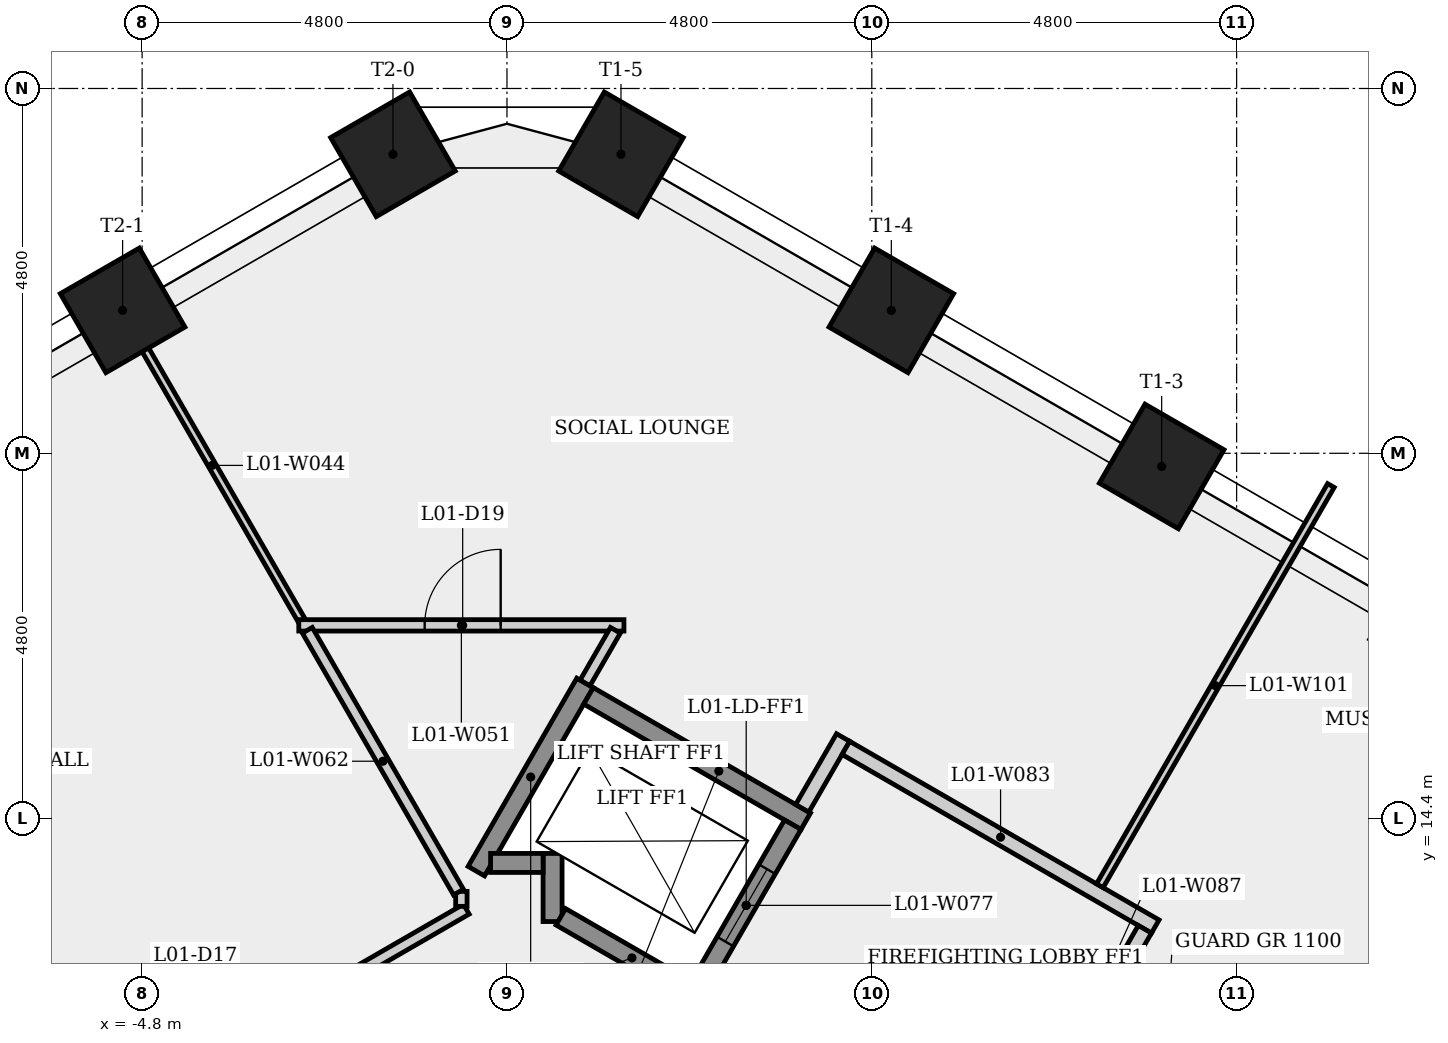
"""IFC4 building model, lengths in metres.
Left out: names, types, materials, properties, quantities, classifications, styles, units other than length and angle.
Written with IfcOpenShell. Run it as: python <this file> out.ifc"""

import sys

from ifc_helpers import new_model, si_unit, direction, frame, frame_2d, origin, origin_2d, place, context, subcontext, project, spatial, rectangle, extrude, element, fill, save


model = new_model("IFC4")
c1 = context("Model", 3, precision=1e-05, world=origin(), true_north=direction((0.0, 1.0)))
c2 = subcontext(c1, "Body", "Model", "MODEL_VIEW")
j1 = project(units=[si_unit("LENGTHUNIT", "METRE"), si_unit("PLANEANGLEUNIT", "RADIAN")], contexts=[c1])
p1 = place(None, origin())
s1 = spatial("IfcSite", under=j1, at=p1, CompositionType="ELEMENT")
p2 = place(p1, origin())
s2 = spatial("IfcBuilding", under=s1, at=p2, CompositionType="ELEMENT")
p3 = place(p2, frame((0.0, 0.0, 7.0)))
s3 = spatial("IfcBuildingStorey", under=s2, at=p3, CompositionType="ELEMENT", Elevation=7.0)
for number, where, z_axis, x_axis in (
    (1, (8.614, 19.027, 0.0), (0.0, 0.0, 1.0), (0.5, 0.866, 0.0)),
    (2, (5.057, 21.08, 0.0), (0.0, 0.0, 1.0), (0.5, 0.866, 0.0)),
    (3, (1.5, 23.134, 0.0), (0.0, 0.0, 1.0), (0.5, 0.866, 0.0)),
    (4, (-1.5, 23.134, 0.0), (0.0, 0.0, 1.0), (-0.5, 0.866, 0.0)),
    (5, (-5.057, 21.08, 0.0), (0.0, 0.0, 1.0), (-0.5, 0.866, 0.0)),
):
    element("IfcColumn", number, at=place(p3, frame(where, z_axis=z_axis, x_axis=x_axis)), inside=s3, PredefinedType="COLUMN", context=c2, shape_type="SweptSolid", body=[
        extrude(rectangle(XDim=1.2, YDim=1.2, at=origin_2d()), origin(), (0.0, 0.0, 1.0), 4.5),
    ])
p4 = place(p3, frame((-10.598, 7.391, 0.0), z_axis=(0.0, 0.0, 1.0), x_axis=(0.866022183431, 0.500005577774, 0.0)))
e6 = element("IfcWall", 6, at=p4, inside=s3, PredefinedType="PARTITIONING", context=c2, shape_type="SweptSolid", body=[
    extrude(rectangle(XDim=11.619, YDim=0.15, at=frame_2d((5.81, 0.0))), origin(), (0.0, 0.0, 1.0), 4.1),
])
p5 = place(p4, frame((7.001, 0.0, 0.0)))
e7 = element("IfcOpeningElement", 7, at=p5, cuts=e6, PredefinedType="OPENING", context=c2, shape_type="SweptSolid", body=[
    extrude(rectangle(XDim=1.0, YDim=2.1, at=frame_2d((0.5, 1.05))), frame((0.0, 0.085, 0.0), z_axis=(0.0, -1.0, 0.0), x_axis=(1.0, 0.0, 0.0)), (0.0, 0.0, 1.0), 0.17),
])
p6 = place(p3, frame((-5.057, 21.08, 0.0), z_axis=(0.0, 0.0, 1.0), x_axis=(0.500018540756, -0.866014699009, 0.0)))
e8 = element("IfcWall", 8, at=p6, inside=s3, PredefinedType="PARTITIONING", context=c2, shape_type="SweptSolid", body=[
    extrude(rectangle(XDim=4.711, YDim=0.1, at=frame_2d((2.355, 0.0))), origin(), (0.0, 0.0, 1.0), 4.1),
])
p7 = place(p3, frame((-2.739, 16.936, 0.0), z_axis=(0.0, 0.0, 1.0), x_axis=(1.0, 0.0, 0.0)))
e9 = element("IfcWall", 9, at=p7, inside=s3, PredefinedType="PARTITIONING", context=c2, shape_type="SweptSolid", body=[
    extrude(rectangle(XDim=4.278, YDim=0.15, at=frame_2d((2.139, 0.0))), origin(), (0.0, 0.0, 1.0), 4.1),
])
p8 = place(p7, frame((1.656, 0.0, 0.0)))
e10 = element("IfcOpeningElement", 10, at=p8, cuts=e9, PredefinedType="OPENING", context=c2, shape_type="SweptSolid", body=[
    extrude(rectangle(XDim=1.0, YDim=2.1, at=frame_2d((0.5, 1.05))), frame((0.0, 0.085, 0.0), z_axis=(0.0, -1.0, 0.0), x_axis=(1.0, 0.0, 0.0)), (0.0, 0.0, 1.0), 0.17),
])
p9 = place(p3, frame((-0.6, 13.239, 0.0), z_axis=(0.0, 0.0, 1.0), x_axis=(0.0, 1.0, 0.0)))
e11 = element("IfcWall", 11, at=p9, inside=s3, PredefinedType="PARTITIONING", context=c2, shape_type="SweptSolid", body=[
    extrude(rectangle(XDim=0.197, YDim=0.15, at=frame_2d((0.099, 0.0))), origin(), (0.0, 0.0, 1.0), 4.1),
])
p10 = place(p3, frame((-0.637, 13.426, 0.0), z_axis=(0.0, 0.0, 1.0), x_axis=(-0.500046503579, 0.865998553266, 0.0)))
e12 = element("IfcWall", 12, at=p10, inside=s3, PredefinedType="PARTITIONING", context=c2, shape_type="SweptSolid", body=[
    extrude(rectangle(XDim=3.978, YDim=0.15, at=frame_2d((1.989, 0.0))), origin(), (0.0, 0.0, 1.0), 4.1),
])
p11 = place(p3, frame((-0.403, 13.702, 0.0), z_axis=(0.0, 0.0, 1.0), x_axis=(0.499976111731, 0.866039195244, 0.0)))
e13 = element("IfcWall", 13, at=p11, inside=s3, PredefinedType="SHEAR", context=c2, shape_type="SweptSolid", body=[
    extrude(rectangle(XDim=2.861, YDim=0.25, at=frame_2d((1.43, 0.0))), origin(), (0.0, 0.0, 1.0), 4.1),
])
p12 = place(p3, frame((0.6, 13.039, 0.0), z_axis=(0.0, 0.0, 1.0), x_axis=(0.0, 1.0, 0.0)))
e14 = element("IfcWall", 14, at=p12, inside=s3, PredefinedType="SHEAR", context=c2, shape_type="SweptSolid", body=[
    extrude(rectangle(XDim=0.896, YDim=0.25, at=frame_2d((0.448, 0.0))), origin(), (0.0, 0.0, 1.0), 4.1),
])
p13 = place(p3, frame((0.475, 13.81, 0.0), z_axis=(0.0, 0.0, 1.0), x_axis=(-1.0, 0.0, 0.0)))
e15 = element("IfcWall", 15, at=p13, inside=s3, PredefinedType="SHEAR", context=c2, shape_type="SweptSolid", body=[
    extrude(rectangle(XDim=0.691, YDim=0.25, at=frame_2d((0.345, 0.0))), origin(), (0.0, 0.0, 1.0), 4.5),
])
p14 = place(p3, frame((1.073, 16.008, 0.0), z_axis=(0.0, 0.0, 1.0), x_axis=(0.866040211805, -0.499974350878, 0.0)))
e16 = element("IfcWall", 16, at=p14, inside=s3, PredefinedType="SHEAR", context=c2, shape_type="SweptSolid", body=[
    extrude(rectangle(XDim=3.3, YDim=0.25, at=frame_2d((1.65, 0.0))), origin(), (0.0, 0.0, 1.0), 4.1),
])
p15 = place(p3, frame((1.427, 16.871, 0.0), z_axis=(0.0, 0.0, 1.0), x_axis=(-0.499951716245, -0.866053278629, 0.0)))
e17 = element("IfcWall", 17, at=p15, inside=s3, PredefinedType="PARTITIONING", context=c2, shape_type="SweptSolid", body=[
    extrude(rectangle(XDim=0.799, YDim=0.15, at=frame_2d((0.399, 0.0))), origin(), (0.0, 0.0, 1.0), 4.1),
])
p16 = place(p3, frame((2.581, 12.02, 0.0), z_axis=(0.0, 0.0, 1.0), x_axis=(-0.86603892542, 0.499976579108, 0.0)))
e18 = element("IfcWall", 18, at=p16, inside=s3, PredefinedType="SHEAR", context=c2, shape_type="SweptSolid", body=[
    extrude(rectangle(XDim=2.162, YDim=0.25, at=frame_2d((1.081, 0.0))), origin(), (0.0, 0.0, 1.0), 4.1),
])
p17 = place(p3, frame((2.535, 12.191, 0.0), z_axis=(0.0, 0.0, 1.0), x_axis=(0.500061746146, 0.865989751695, 0.0)))
e19 = element("IfcWall", 19, at=p17, inside=s3, PredefinedType="SHEAR", context=c2, shape_type="SweptSolid", body=[
    extrude(rectangle(XDim=2.45, YDim=0.25, at=frame_2d((1.225, 0.0))), origin(), (0.0, 0.0, 1.0), 4.5),
])
p18 = place(p17, frame((0.675, 0.0, 0.0)))
e20 = element("IfcOpeningElement", 20, at=p18, cuts=e19, PredefinedType="OPENING", context=c2, shape_type="SweptSolid", body=[
    extrude(rectangle(XDim=1.1, YDim=2.1, at=frame_2d((0.55, 1.05))), frame((0.0, 0.135, 0.0), z_axis=(0.0, -1.0, 0.0), x_axis=(1.0, 0.0, 0.0)), (0.0, 0.0, 1.0), 0.27),
])
p19 = place(p3, frame((3.885, 14.529, 0.0), z_axis=(0.0, 0.0, 1.0), x_axis=(0.499997628298, 0.866026773083, 0.0)))
e21 = element("IfcWall", 21, at=p19, inside=s3, PredefinedType="PARTITIONING", context=c2, shape_type="SweptSolid", body=[
    extrude(rectangle(XDim=1.075, YDim=0.2, at=frame_2d((0.538, 0.0))), origin(), (0.0, 0.0, 1.0), 4.1),
])
p20 = place(p3, frame((4.459, 15.323, 0.0), z_axis=(0.0, 0.0, 1.0), x_axis=(0.866016039709, -0.500016218704, 0.0)))
e22 = element("IfcWall", 22, at=p20, inside=s3, PredefinedType="PARTITIONING", context=c2, shape_type="SweptSolid", body=[
    extrude(rectangle(XDim=4.7, YDim=0.2, at=frame_2d((2.35, 0.0))), origin(), (0.0, 0.0, 1.0), 4.1),
])
p21 = place(p3, frame((6.48, 9.624, 0.0), z_axis=(0.0, 0.0, 1.0), x_axis=(0.500017246033, 0.866015446554, 0.0)))
e23 = element("IfcWall", 23, at=p21, inside=s3, PredefinedType="SHEAR", context=c2, shape_type="SweptSolid", body=[
    extrude(rectangle(XDim=3.25, YDim=0.25, at=frame_2d((1.625, 0.0))), origin(), (0.0, 0.0, 1.0), 4.1),
])
p22 = place(p21, frame((1.125, 0.0, 0.0)))
e24 = element("IfcOpeningElement", 24, at=p22, cuts=e23, PredefinedType="OPENING", context=c2, shape_type="SweptSolid", body=[
    extrude(rectangle(XDim=1.0, YDim=2.1, at=frame_2d((0.5, 1.05))), frame((0.0, 0.135, 0.0), z_axis=(0.0, -1.0, 0.0), x_axis=(1.0, 0.0, 0.0)), (0.0, 0.0, 1.0), 0.27),
])
p23 = place(p3, frame((8.393, 12.937, 0.0), z_axis=(0.0, 0.0, 1.0), x_axis=(-0.500065409566, -0.86598763626, 0.0)))
e25 = element("IfcWall", 25, at=p23, inside=s3, PredefinedType="PARTITIONING", context=c2, shape_type="SweptSolid", body=[
    extrude(rectangle(XDim=0.575, YDim=0.2, at=frame_2d((0.288, 0.0))), origin(), (0.0, 0.0, 1.0), 4.1),
])
p24 = place(p3, frame((10.84, 18.776, 0.0), z_axis=(0.0, 0.0, 1.0), x_axis=(-0.500003976293, -0.866023108059, 0.0)))
e26 = element("IfcWall", 26, at=p24, inside=s3, PredefinedType="PARTITIONING", context=c2, shape_type="SweptSolid", body=[
    extrude(rectangle(XDim=6.081, YDim=0.1, at=frame_2d((3.04, 0.0))), origin(), (0.0, 0.0, 1.0), 4.1),
])
p25 = place(p18, origin())
e27 = element("IfcDoor", 27, at=p25, inside=s3, OperationType="SLIDING_TO_LEFT", PredefinedType="DOOR", context=c2, shape_type="SweptSolid", body=[
    extrude(rectangle(XDim=1.1, YDim=2.1, at=frame_2d((0.55, 1.05))), frame((0.0, 0.025, 0.0), z_axis=(0.0, -1.0, 0.0), x_axis=(1.0, 0.0, 0.0)), (0.0, 0.0, 1.0), 0.05),
])
fill(e20, e27)
p26 = place(p8, origin())
e28 = element("IfcDoor", 28, at=p26, inside=s3, OperationType="SINGLE_SWING_RIGHT", PredefinedType="DOOR", context=c2, shape_type="SweptSolid", body=[
    extrude(rectangle(XDim=1.0, YDim=2.1, at=frame_2d((0.5, 1.05))), frame((0.0, 0.025, 0.0), z_axis=(0.0, -1.0, 0.0), x_axis=(1.0, 0.0, 0.0)), (0.0, 0.0, 1.0), 0.05),
])
fill(e10, e28)
save(model, sys.argv[1])
